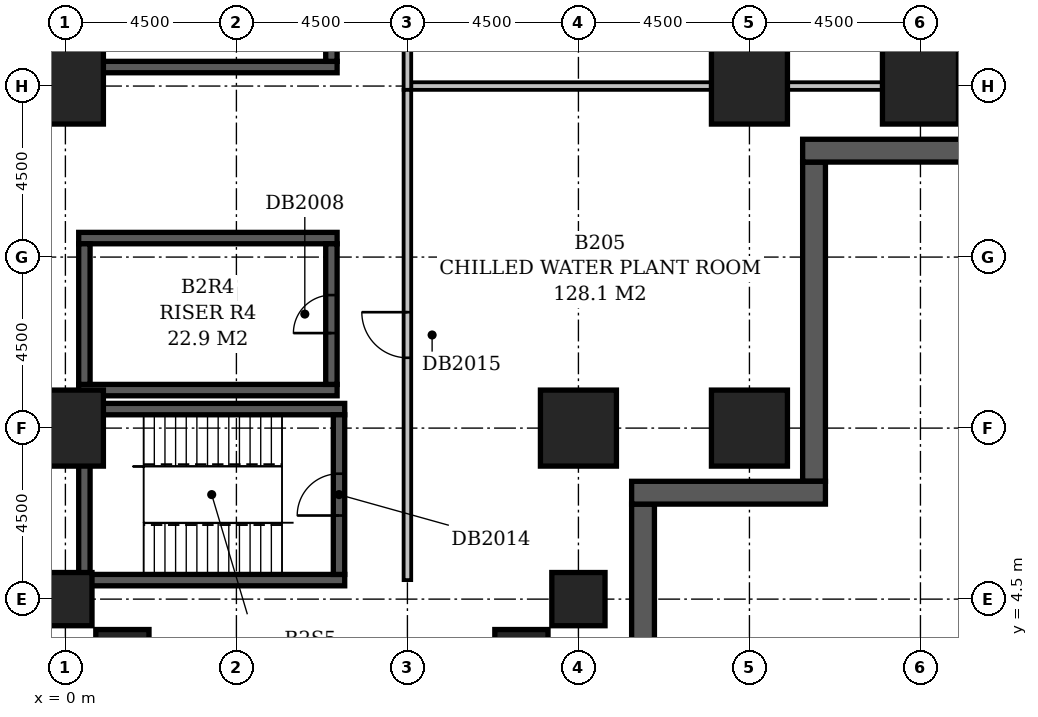
"""IFC4 building model, lengths in metres.
Left out: names, types, materials, properties, quantities, classifications, styles, units other than length and angle.
Written with IfcOpenShell. Run it as: python <this file> out.ifc"""

import sys

from ifc_helpers import new_model, si_unit, direction, frame, frame_2d, origin, origin_2d, place, context, subcontext, project, spatial, rectangle, extrude, element, fill, save


model = new_model("IFC4")
c1 = context("Model", 3, precision=1e-05, world=origin(), true_north=direction((0.0, 1.0)))
c2 = subcontext(c1, "Body", "Model", "MODEL_VIEW")
j1 = project(units=[si_unit("LENGTHUNIT", "METRE"), si_unit("PLANEANGLEUNIT", "RADIAN")], contexts=[c1])
p1 = place(None, origin())
s1 = spatial("IfcSite", under=j1, at=p1, CompositionType="ELEMENT")
p2 = place(p1, origin())
s2 = spatial("IfcBuilding", under=s1, at=p2, CompositionType="ELEMENT")
p3 = place(p2, frame((0.0, 0.0, -9.0)))
s3 = spatial("IfcBuildingStorey", under=s2, at=p3, CompositionType="ELEMENT", Elevation=-9.0)
for number, where, z_axis, x_axis in (
    (1, (1.5, 3.0, 0.0), (0.0, 0.0, 1.0), (1.0, 0.0, 0.0)),
    (2, (12.0, 3.0, 0.0), (0.0, 0.0, 1.0), (1.0, 0.0, 0.0)),
    (3, (0.0, 4.5, 0.0), (0.0, 0.0, 1.0), (1.0, 0.0, 0.0)),
    (4, (13.5, 4.5, 0.0), (0.0, 0.0, 1.0), (1.0, 0.0, 0.0)),
):
    element("IfcColumn", number, at=place(p3, frame(where, z_axis=z_axis, x_axis=x_axis)), inside=s3, PredefinedType="COLUMN", context=c2, shape_type="SweptSolid", body=[
        extrude(rectangle(XDim=1.4, YDim=1.4, at=origin_2d()), origin(), (0.0, 0.0, 1.0), 4.1),
    ])
for number, where, z_axis, x_axis in (
    (5, (0.0, 9.0, 0.0), (0.0, 0.0, 1.0), (1.0, 0.0, 0.0)),
    (6, (13.5, 9.0, 0.0), (0.0, 0.0, 1.0), (1.0, 0.0, 0.0)),
    (7, (18.0, 9.0, 0.0), (0.0, 0.0, 1.0), (1.0, 0.0, 0.0)),
    (8, (0.0, 18.0, 0.0), (0.0, 0.0, 1.0), (1.0, 0.0, 0.0)),
    (9, (18.0, 18.0, 0.0), (0.0, 0.0, 1.0), (1.0, 0.0, 0.0)),
    (10, (22.5, 18.0, 0.0), (0.0, 0.0, 1.0), (1.0, 0.0, 0.0)),
):
    element("IfcColumn", number, at=place(p3, frame(where, z_axis=z_axis, x_axis=x_axis)), inside=s3, PredefinedType="COLUMN", context=c2, shape_type="SweptSolid", body=[
        extrude(rectangle(XDim=2.0, YDim=2.0, at=origin_2d()), origin(), (0.0, 0.0, 1.0), 4.1),
    ])
p4 = place(p3, frame((24.5, 16.3, 0.0), z_axis=(0.0, 0.0, 1.0), x_axis=(-1.0, 0.0, 0.0)))
e11 = element("IfcWall", 11, at=p4, inside=s3, PredefinedType="SOLIDWALL", context=c2, shape_type="SweptSolid", body=[
    extrude(rectangle(XDim=5.1, YDim=0.6, at=frame_2d((2.55, 0.0))), origin(), (0.0, 0.0, 1.0), 4.1),
])
p5 = place(p3, frame((19.7, 16.0, 0.0), z_axis=(0.0, 0.0, 1.0), x_axis=(0.0, -1.0, 0.0)))
e12 = element("IfcWall", 12, at=p5, inside=s3, PredefinedType="SOLIDWALL", context=c2, shape_type="SweptSolid", body=[
    extrude(rectangle(XDim=8.4, YDim=0.6, at=frame_2d((4.2, 0.0))), origin(), (0.0, 0.0, 1.0), 4.1),
])
p6 = place(p3, frame((20.0, 7.3, 0.0), z_axis=(0.0, 0.0, 1.0), x_axis=(-1.0, 0.0, 0.0)))
e13 = element("IfcWall", 13, at=p6, inside=s3, PredefinedType="SOLIDWALL", context=c2, shape_type="SweptSolid", body=[
    extrude(rectangle(XDim=5.1, YDim=0.6, at=frame_2d((2.55, 0.0))), origin(), (0.0, 0.0, 1.0), 4.1),
])
p7 = place(p3, frame((15.2, 7.0, 0.0), z_axis=(0.0, 0.0, 1.0), x_axis=(0.0, -1.0, 0.0)))
e14 = element("IfcWall", 14, at=p7, inside=s3, PredefinedType="SOLIDWALL", context=c2, shape_type="SweptSolid", body=[
    extrude(rectangle(XDim=8.4, YDim=0.6, at=frame_2d((4.2, 0.0))), origin(), (0.0, 0.0, 1.0), 4.1),
])
for number, where, z_axis, x_axis in (
    (15, (0.35, 5.0, 0.0), (0.0, 0.0, 1.0), (1.0, 0.0, 0.0)),
    (16, (0.35, 9.5, 0.0), (0.0, 0.0, 1.0), (1.0, 0.0, 0.0)),
):
    element("IfcWall", number, at=place(p3, frame(where, z_axis=z_axis, x_axis=x_axis)), inside=s3, PredefinedType="SHEAR", context=c2, shape_type="SweptSolid", body=[
        extrude(rectangle(XDim=7.0, YDim=0.3, at=frame_2d((3.5, 0.0))), origin(), (0.0, 0.0, 1.0), 4.1),
    ])
for number, where, z_axis, x_axis in (
    (17, (0.35, 10.0, 0.0), (0.0, 0.0, 1.0), (1.0, 0.0, 0.0)),
    (18, (0.35, 14.0, 0.0), (0.0, 0.0, 1.0), (1.0, 0.0, 0.0)),
    (19, (0.35, 18.5, 0.0), (0.0, 0.0, 1.0), (1.0, 0.0, 0.0)),
):
    element("IfcWall", number, at=place(p3, frame(where, z_axis=z_axis, x_axis=x_axis)), inside=s3, PredefinedType="SHEAR", context=c2, shape_type="SweptSolid", body=[
        extrude(rectangle(XDim=6.8, YDim=0.3, at=frame_2d((3.4, 0.0))), origin(), (0.0, 0.0, 1.0), 4.1),
    ])
p8 = place(p3, frame((0.5, 5.15, 0.0), z_axis=(0.0, 0.0, 1.0), x_axis=(0.0, 1.0, 0.0)))
e20 = element("IfcWall", 20, at=p8, inside=s3, PredefinedType="SHEAR", context=c2, shape_type="SweptSolid", body=[
    extrude(rectangle(XDim=4.2, YDim=0.3, at=frame_2d((2.1, 0.0))), origin(), (0.0, 0.0, 1.0), 4.1),
])
p9 = place(p3, frame((0.5, 10.15, 0.0), z_axis=(0.0, 0.0, 1.0), x_axis=(0.0, 1.0, 0.0)))
e21 = element("IfcWall", 21, at=p9, inside=s3, PredefinedType="SHEAR", context=c2, shape_type="SweptSolid", body=[
    extrude(rectangle(XDim=3.7, YDim=0.3, at=frame_2d((1.85, 0.0))), origin(), (0.0, 0.0, 1.0), 4.1),
])
p10 = place(p3, frame((0.5, 18.65, 0.0), z_axis=(0.0, 0.0, 1.0), x_axis=(0.0, 1.0, 0.0)))
e22 = element("IfcWall", 22, at=p10, inside=s3, PredefinedType="SHEAR", context=c2, shape_type="SweptSolid", body=[
    extrude(rectangle(XDim=3.85, YDim=0.3, at=frame_2d((1.925, 0.0))), origin(), (0.0, 0.0, 1.0), 4.1),
])
p11 = place(p3, frame((7.0, 10.15, 0.0), z_axis=(0.0, 0.0, 1.0), x_axis=(0.0, 1.0, 0.0)))
e23 = element("IfcWall", 23, at=p11, inside=s3, PredefinedType="SHEAR", context=c2, shape_type="SweptSolid", body=[
    extrude(rectangle(XDim=3.7, YDim=0.3, at=frame_2d((1.85, 0.0))), origin(), (0.0, 0.0, 1.0), 4.1),
])
p12 = place(p11, frame((1.35, 0.0, 0.0)))
e24 = element("IfcOpeningElement", 24, at=p12, cuts=e23, PredefinedType="OPENING", context=c2, shape_type="SweptSolid", body=[
    extrude(rectangle(XDim=1.0, YDim=2.1, at=frame_2d((0.5, 1.05))), frame((0.0, 0.162, 0.0), z_axis=(0.0, -1.0, 0.0), x_axis=(1.0, 0.0, 0.0)), (0.0, 0.0, 1.0), 0.324),
])
p13 = place(p3, frame((7.0, 18.65, 0.0), z_axis=(0.0, 0.0, 1.0), x_axis=(0.0, 1.0, 0.0)))
e25 = element("IfcWall", 25, at=p13, inside=s3, PredefinedType="SHEAR", context=c2, shape_type="SweptSolid", body=[
    extrude(rectangle(XDim=3.7, YDim=0.3, at=frame_2d((1.85, 0.0))), origin(), (0.0, 0.0, 1.0), 4.1),
])
p14 = place(p13, frame((1.35, 0.0, 0.0)))
e26 = element("IfcOpeningElement", 26, at=p14, cuts=e25, PredefinedType="OPENING", context=c2, shape_type="SweptSolid", body=[
    extrude(rectangle(XDim=1.0, YDim=2.1, at=frame_2d((0.5, 1.05))), frame((0.0, 0.162, 0.0), z_axis=(0.0, -1.0, 0.0), x_axis=(1.0, 0.0, 0.0)), (0.0, 0.0, 1.0), 0.324),
])
p15 = place(p3, frame((7.2, 5.15, 0.0), z_axis=(0.0, 0.0, 1.0), x_axis=(0.0, 1.0, 0.0)))
e27 = element("IfcWall", 27, at=p15, inside=s3, PredefinedType="SHEAR", context=c2, shape_type="SweptSolid", body=[
    extrude(rectangle(XDim=4.2, YDim=0.3, at=frame_2d((2.1, 0.0))), origin(), (0.0, 0.0, 1.0), 4.1),
])
p16 = place(p15, frame((1.55, 0.0, 0.0)))
e28 = element("IfcOpeningElement", 28, at=p16, cuts=e27, PredefinedType="OPENING", context=c2, shape_type="SweptSolid", body=[
    extrude(rectangle(XDim=1.1, YDim=2.1, at=frame_2d((0.55, 1.05))), frame((0.0, 0.162, 0.0), z_axis=(0.0, -1.0, 0.0), x_axis=(1.0, 0.0, 0.0)), (0.0, 0.0, 1.0), 0.324),
])
p17 = place(p3, frame((9.0, 5.0, 0.0), z_axis=(0.0, 0.0, 1.0), x_axis=(0.0, 1.0, 0.0)))
e29 = element("IfcWall", 29, at=p17, inside=s3, PredefinedType="PARTITIONING", context=c2, shape_type="SweptSolid", body=[
    extrude(rectangle(XDim=12.9, YDim=0.2, at=frame_2d((6.45, 0.0))), origin(), (0.0, 0.0, 1.0), 4.1),
])
p18 = place(p17, frame((5.85, 0.0, 0.0)))
e30 = element("IfcOpeningElement", 30, at=p18, cuts=e29, PredefinedType="OPENING", context=c2, shape_type="SweptSolid", body=[
    extrude(rectangle(XDim=1.2, YDim=2.1, at=frame_2d((0.6, 1.05))), frame((0.0, 0.112, 0.0), z_axis=(0.0, -1.0, 0.0), x_axis=(1.0, 0.0, 0.0)), (0.0, 0.0, 1.0), 0.224),
])
p19 = place(p3, frame((9.0, 17.9, 0.0), z_axis=(0.0, 0.0, 1.0), x_axis=(0.0, 1.0, 0.0)))
e31 = element("IfcWall", 31, at=p19, inside=s3, PredefinedType="PARTITIONING", context=c2, shape_type="SweptSolid", body=[
    extrude(rectangle(XDim=13.7, YDim=0.2, at=frame_2d((6.85, 0.0))), origin(), (0.0, 0.0, 1.0), 4.1),
])
p20 = place(p19, frame((6.25, 0.0, 0.0)))
e32 = element("IfcOpeningElement", 32, at=p20, cuts=e31, PredefinedType="OPENING", context=c2, shape_type="SweptSolid", body=[
    extrude(rectangle(XDim=1.2, YDim=2.1, at=frame_2d((0.6, 1.05))), frame((0.0, 0.112, 0.0), z_axis=(0.0, -1.0, 0.0), x_axis=(1.0, 0.0, 0.0)), (0.0, 0.0, 1.0), 0.224),
])
p21 = place(p3, frame((22.5, 18.0, 0.0), z_axis=(0.0, 0.0, 1.0), x_axis=(-1.0, 0.0, 0.0)))
e33 = element("IfcWall", 33, at=p21, inside=s3, PredefinedType="PARTITIONING", context=c2, shape_type="SweptSolid", body=[
    extrude(rectangle(XDim=13.4, YDim=0.2, at=frame_2d((6.7, 0.0))), origin(), (0.0, 0.0, 1.0), 3.4),
])
p22 = place(p12, origin())
e34 = element("IfcDoor", 34, at=p22, inside=s3, OperationType="SINGLE_SWING_LEFT", PredefinedType="DOOR", context=c2, shape_type="SweptSolid", body=[
    extrude(rectangle(XDim=1.0, YDim=2.1, at=frame_2d((0.5, 1.05))), frame((0.0, 0.025, 0.0), z_axis=(0.0, -1.0, 0.0), x_axis=(1.0, 0.0, 0.0)), (0.0, 0.0, 1.0), 0.05),
])
fill(e24, e34)
p23 = place(p16, origin())
e35 = element("IfcDoor", 35, at=p23, inside=s3, OperationType="SINGLE_SWING_LEFT", PredefinedType="DOOR", context=c2, shape_type="SweptSolid", body=[
    extrude(rectangle(XDim=1.1, YDim=2.1, at=frame_2d((0.55, 1.05))), frame((0.0, 0.025, 0.0), z_axis=(0.0, -1.0, 0.0), x_axis=(1.0, 0.0, 0.0)), (0.0, 0.0, 1.0), 0.05),
])
fill(e28, e35)
p24 = place(p18, frame((1.2, 0.0, 0.0), z_axis=(0.0, 0.0, 1.0), x_axis=(-1.0, 0.0, 0.0)))
e36 = element("IfcDoor", 36, at=p24, inside=s3, OperationType="SINGLE_SWING_LEFT", PredefinedType="DOOR", context=c2, shape_type="SweptSolid", body=[
    extrude(rectangle(XDim=1.2, YDim=2.1, at=frame_2d((0.6, 1.05))), frame((0.0, 0.025, 0.0), z_axis=(0.0, -1.0, 0.0), x_axis=(1.0, 0.0, 0.0)), (0.0, 0.0, 1.0), 0.05),
])
fill(e30, e36)
save(model, sys.argv[1])
